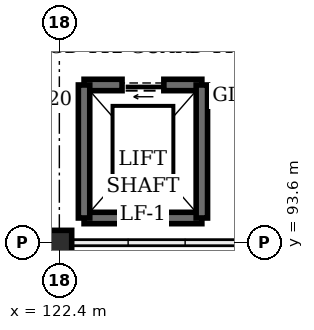
"""IFC4 building model, lengths in metres.
Left out: names, types, materials, properties, quantities, classifications, styles, units other than length and angle.
Written with IfcOpenShell. Run it as: python <this file> out.ifc"""

import sys

from ifc_helpers import new_model, si_unit, direction, frame, frame_2d, origin, origin_2d, place, context, subcontext, project, spatial, rectangle, extrude, element, fill, save


model = new_model("IFC4")
c1 = context("Model", 3, precision=1e-05, world=origin(), true_north=direction((0.0, 1.0)))
c2 = subcontext(c1, "Body", "Model", "MODEL_VIEW")
j1 = project(units=[si_unit("LENGTHUNIT", "METRE"), si_unit("PLANEANGLEUNIT", "RADIAN")], contexts=[c1])
p1 = place(None, origin())
s1 = spatial("IfcSite", under=j1, at=p1, CompositionType="ELEMENT")
p2 = place(p1, origin())
s2 = spatial("IfcBuilding", under=s1, at=p2, CompositionType="ELEMENT")
p3 = place(p2, frame((0.0, 0.0, 14.4)))
s3 = spatial("IfcBuildingStorey", under=s2, at=p3, CompositionType="ELEMENT", Elevation=14.4)
p4 = place(p3, frame((122.4, 93.6, 0.0), z_axis=(0.0, 0.0, 1.0), x_axis=(1.0, 0.0, 0.0)))
e1 = element("IfcColumn", 1, at=p4, inside=s3, PredefinedType="COLUMN", context=c2, shape_type="SweptSolid", body=[
    extrude(rectangle(XDim=0.65, YDim=0.65, at=origin_2d()), origin(), (0.0, 0.0, 1.0), 3.6),
])
p5 = place(p3, frame((123.05, 94.25, 0.0), z_axis=(0.0, 0.0, 1.0), x_axis=(1.0, 0.0, 0.0)))
e2 = element("IfcWall", 2, at=p5, inside=s3, PredefinedType="SHEAR", context=c2, shape_type="SweptSolid", body=[
    extrude(rectangle(XDim=3.1, YDim=0.3, at=frame_2d((1.55, 0.0))), origin(), (0.0, 0.0, 1.0), 3.36),
])
p6 = place(p3, frame((126.15, 97.75, 0.0), z_axis=(0.0, 0.0, 1.0), x_axis=(-1.0, 0.0, 0.0)))
e3 = element("IfcWall", 3, at=p6, inside=s3, PredefinedType="SHEAR", context=c2, shape_type="SweptSolid", body=[
    extrude(rectangle(XDim=3.1, YDim=0.3, at=frame_2d((1.55, 0.0))), origin(), (0.0, 0.0, 1.0), 3.36),
])
p7 = place(p6, frame((1.0, 0.0, 0.0)))
e4 = element("IfcOpeningElement", 4, at=p7, cuts=e3, PredefinedType="OPENING", context=c2, shape_type="SweptSolid", body=[
    extrude(rectangle(XDim=1.1, YDim=2.22, at=frame_2d((0.55, 1.11))), frame((0.0, 0.16, 0.0), z_axis=(0.0, -1.0, 0.0), x_axis=(1.0, 0.0, 0.0)), (0.0, 0.0, 1.0), 0.32),
])
for number, where, z_axis, x_axis in (
    (5, (123.05, 97.75, 0.0), (0.0, 0.0, 1.0), (0.0, -1.0, 0.0)),
    (6, (126.15, 94.25, 0.0), (0.0, 0.0, 1.0), (0.0, 1.0, 0.0)),
):
    element("IfcWall", number, at=place(p3, frame(where, z_axis=z_axis, x_axis=x_axis)), inside=s3, PredefinedType="SHEAR", context=c2, shape_type="SweptSolid", body=[
        extrude(rectangle(XDim=3.5, YDim=0.3, at=frame_2d((1.75, 0.0))), origin(), (0.0, 0.0, 1.0), 3.36),
    ])
p8 = place(p7, origin())
e7 = element("IfcDoor", 7, at=p8, inside=s3, OperationType="SLIDING_TO_LEFT", PredefinedType="DOOR", context=c2, shape_type="SweptSolid", body=[
    extrude(rectangle(XDim=1.1, YDim=2.22, at=frame_2d((0.55, 1.11))), frame((0.0, 0.025, 0.0), z_axis=(0.0, -1.0, 0.0), x_axis=(1.0, 0.0, 0.0)), (0.0, 0.0, 1.0), 0.05),
])
fill(e4, e7)
save(model, sys.argv[1])
